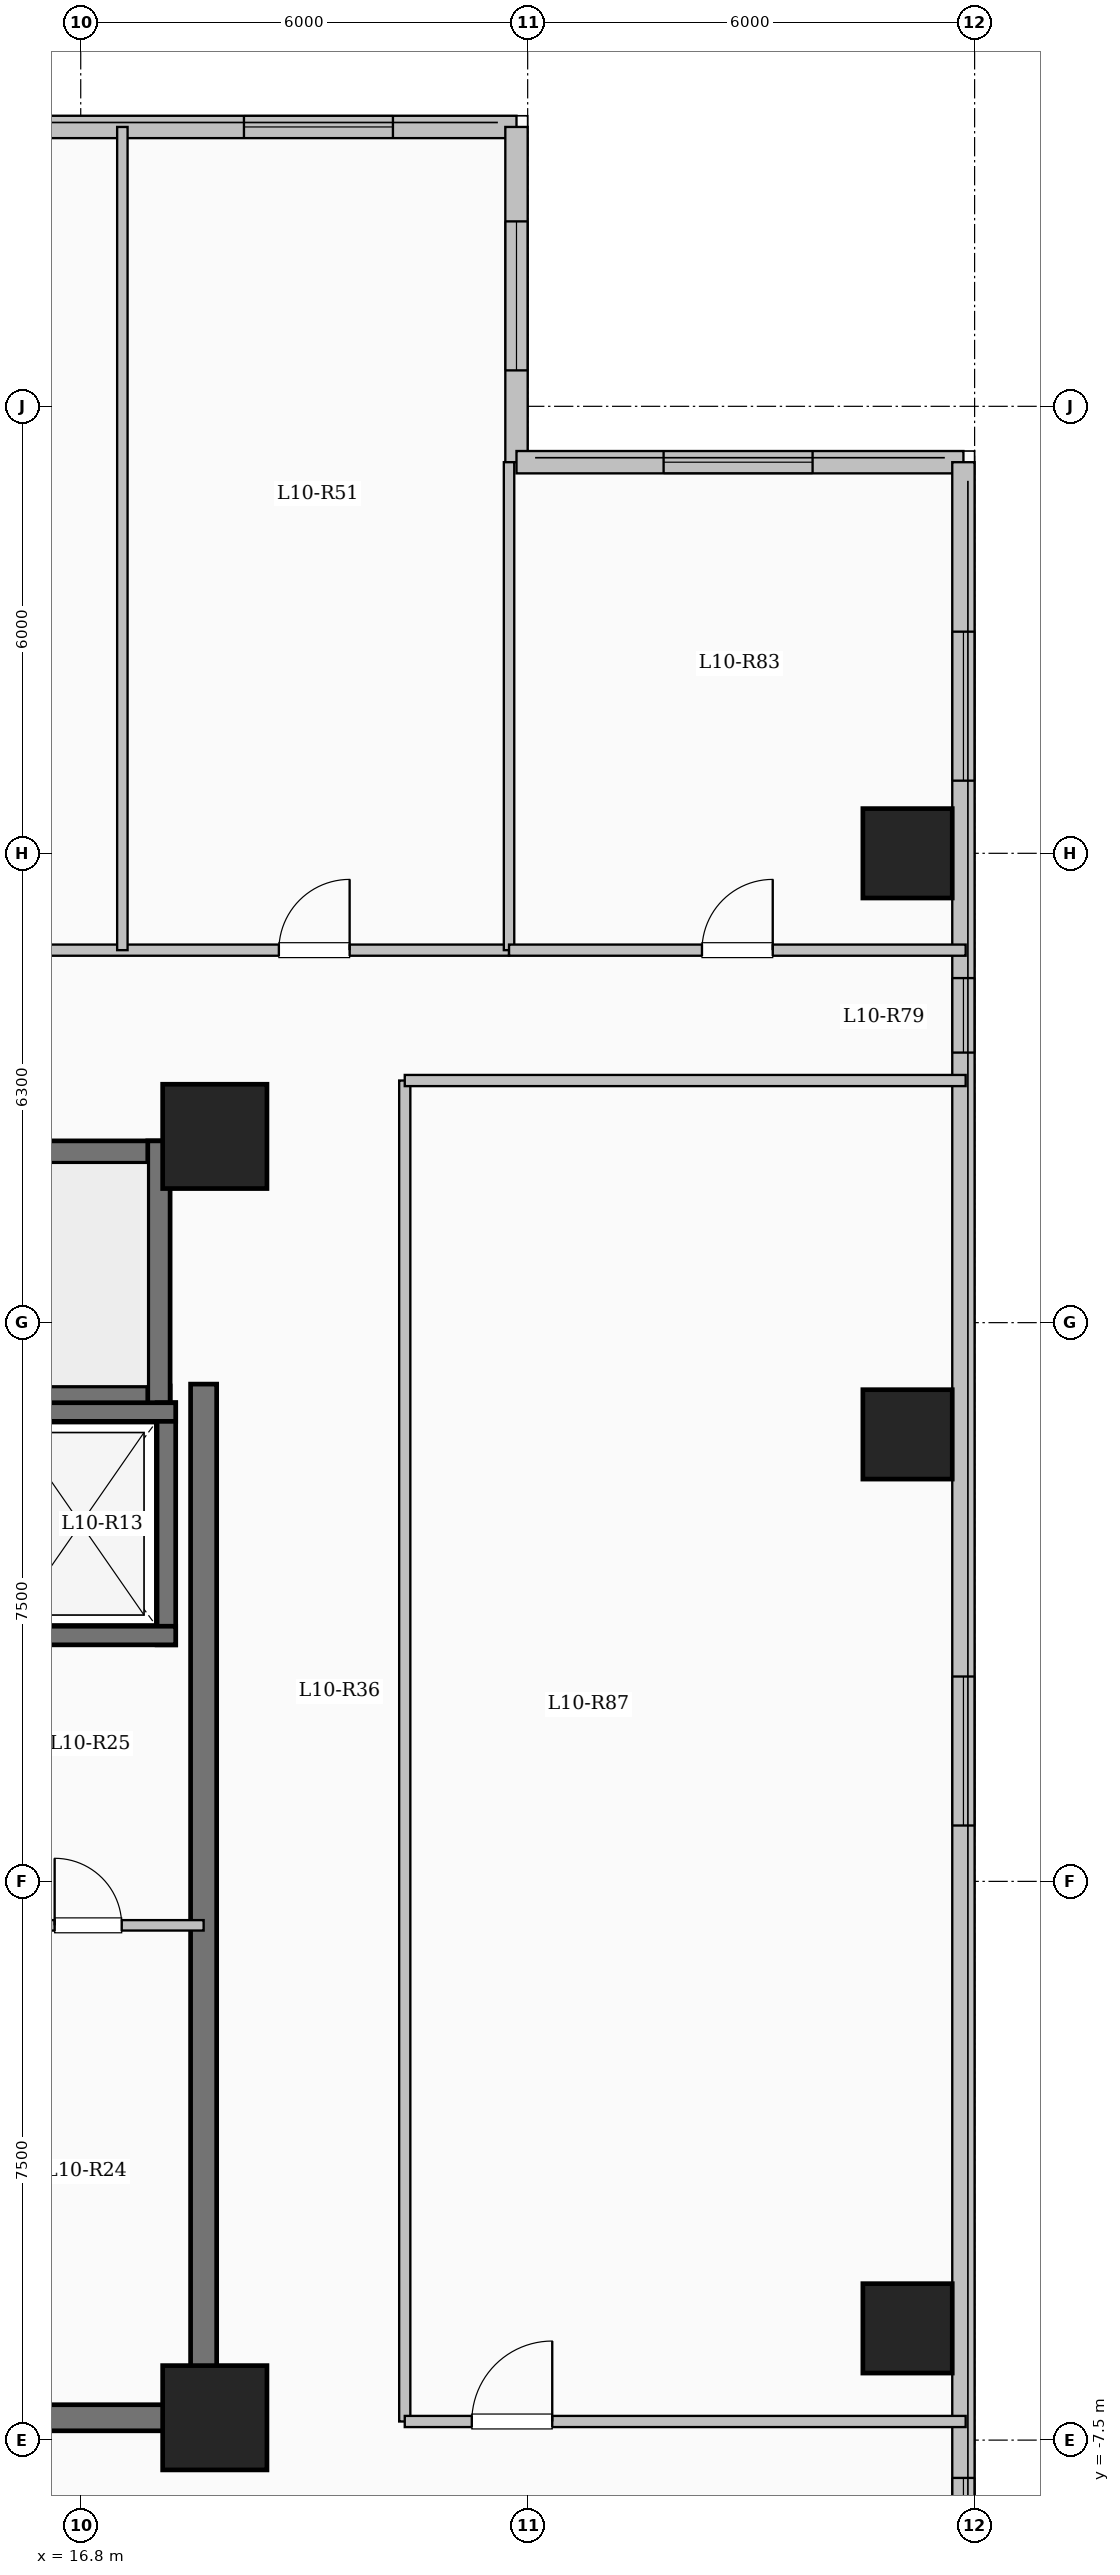
"""IFC4 building model, lengths in metres.
Left out: names, types, materials, properties, quantities, classifications, styles, units other than length and angle.
Written with IfcOpenShell. Run it as: python <this file> out.ifc"""

import sys

from ifc_helpers import new_model, si_unit, direction, frame, frame_2d, origin, origin_2d, place, context, subcontext, project, spatial, rectangle, extrude, element, fill, save


model = new_model("IFC4")
c1 = context("Model", 3, precision=1e-05, world=origin(), true_north=direction((0.0, 1.0)))
c2 = subcontext(c1, "Body", "Model", "MODEL_VIEW")
j1 = project(units=[si_unit("LENGTHUNIT", "METRE"), si_unit("PLANEANGLEUNIT", "RADIAN")], contexts=[c1])
p1 = place(None, origin())
s1 = spatial("IfcSite", under=j1, at=p1, CompositionType="ELEMENT")
p2 = place(p1, origin())
s2 = spatial("IfcBuilding", under=s1, at=p2, CompositionType="ELEMENT")
p3 = place(p2, frame((0.0, 0.0, 40.75)))
s3 = spatial("IfcBuildingStorey", under=s2, at=p3, CompositionType="ELEMENT", Elevation=40.75)
for number, where, z_axis, x_axis in (
    (1, (18.6, -7.2, 0.0), (0.0, 0.0, 1.0), (1.0, 0.0, 0.0)),
    (2, (18.6, 10.0, 0.0), (0.0, 0.0, 1.0), (1.0, 0.0, 0.0)),
):
    element("IfcColumn", number, at=place(p3, frame(where, z_axis=z_axis, x_axis=x_axis)), inside=s3, PredefinedType="COLUMN", context=c2, shape_type="SweptSolid", body=[
        extrude(rectangle(XDim=1.4, YDim=1.4, at=origin_2d()), origin(), (0.0, 0.0, 1.0), 3.35),
    ])
for number, where, z_axis, x_axis in (
    (3, (27.9, -6.0, 0.0), (0.0, 0.0, 1.0), (1.0, 0.0, 0.0)),
    (4, (27.9, 6.0, 0.0), (0.0, 0.0, 1.0), (1.0, 0.0, 0.0)),
    (5, (27.9, 13.8, 0.0), (0.0, 0.0, 1.0), (1.0, 0.0, 0.0)),
):
    element("IfcColumn", number, at=place(p3, frame(where, z_axis=z_axis, x_axis=x_axis)), inside=s3, PredefinedType="COLUMN", context=c2, shape_type="SweptSolid", body=[
        extrude(rectangle(XDim=1.2, YDim=1.2, at=origin_2d()), origin(), (0.0, 0.0, 1.0), 3.35),
    ])
p4 = place(p3, frame((7.35, 23.55, 0.0), z_axis=(0.0, 0.0, 1.0), x_axis=(1.0, 0.0, 0.0)))
e6 = element("IfcWall", 6, at=p4, inside=s3, PredefinedType="SOLIDWALL", context=c2, shape_type="SweptSolid", body=[
    extrude(rectangle(XDim=15.3, YDim=0.3, at=frame_2d((7.65, 0.0))), origin(), (0.0, 0.0, 1.0), 3.1),
])
p5 = place(p4, frame((0.705, 0.0, 0.9)))
e7 = element("IfcOpeningElement", 7, at=p5, cuts=e6, PredefinedType="OPENING", context=c2, shape_type="SweptSolid", body=[
    extrude(rectangle(XDim=1.8, YDim=1.65, at=frame_2d((0.9, 0.825))), frame((0.0, 0.16, 0.0), z_axis=(0.0, -1.0, 0.0), x_axis=(1.0, 0.0, 0.0)), (0.0, 0.0, 1.0), 0.32),
])
p6 = place(p4, frame((5.672, 0.0, 0.9)))
e8 = element("IfcOpeningElement", 8, at=p6, cuts=e6, PredefinedType="OPENING", context=c2, shape_type="SweptSolid", body=[
    extrude(rectangle(XDim=2.0, YDim=1.7, at=frame_2d((1.0, 0.85))), frame((0.0, 0.16, 0.0), z_axis=(0.0, -1.0, 0.0), x_axis=(1.0, 0.0, 0.0)), (0.0, 0.0, 1.0), 0.32),
])
p7 = place(p4, frame((11.641, 0.0, 0.9)))
e9 = element("IfcOpeningElement", 9, at=p7, cuts=e6, PredefinedType="OPENING", context=c2, shape_type="SweptSolid", body=[
    extrude(rectangle(XDim=2.0, YDim=1.7, at=frame_2d((1.0, 0.85))), frame((0.0, 0.16, 0.0), z_axis=(0.0, -1.0, 0.0), x_axis=(1.0, 0.0, 0.0)), (0.0, 0.0, 1.0), 0.32),
])
p8 = place(p3, frame((22.65, 23.55, 0.0), z_axis=(0.0, 0.0, 1.0), x_axis=(0.0, -1.0, 0.0)))
e10 = element("IfcWall", 10, at=p8, inside=s3, PredefinedType="SOLIDWALL", context=c2, shape_type="SweptSolid", body=[
    extrude(rectangle(XDim=4.5, YDim=0.3, at=frame_2d((2.25, 0.0))), origin(), (0.0, 0.0, 1.0), 3.1),
])
p9 = place(p8, frame((1.268, 0.0, 0.9)))
e11 = element("IfcOpeningElement", 11, at=p9, cuts=e10, PredefinedType="OPENING", context=c2, shape_type="SweptSolid", body=[
    extrude(rectangle(XDim=2.0, YDim=1.7, at=frame_2d((1.0, 0.85))), frame((0.0, 0.16, 0.0), z_axis=(0.0, -1.0, 0.0), x_axis=(1.0, 0.0, 0.0)), (0.0, 0.0, 1.0), 0.32),
])
p10 = place(p3, frame((22.65, 19.05, 0.0), z_axis=(0.0, 0.0, 1.0), x_axis=(1.0, 0.0, 0.0)))
e12 = element("IfcWall", 12, at=p10, inside=s3, PredefinedType="SOLIDWALL", context=c2, shape_type="SweptSolid", body=[
    extrude(rectangle(XDim=6.0, YDim=0.3, at=frame_2d((3.0, 0.0))), origin(), (0.0, 0.0, 1.0), 3.1),
])
p11 = place(p10, frame((1.975, 0.0, 0.9)))
e13 = element("IfcOpeningElement", 13, at=p11, cuts=e12, PredefinedType="OPENING", context=c2, shape_type="SweptSolid", body=[
    extrude(rectangle(XDim=2.0, YDim=1.7, at=frame_2d((1.0, 0.85))), frame((0.0, 0.16, 0.0), z_axis=(0.0, -1.0, 0.0), x_axis=(1.0, 0.0, 0.0)), (0.0, 0.0, 1.0), 0.32),
])
p12 = place(p3, frame((28.65, 19.05, 0.0), z_axis=(0.0, 0.0, 1.0), x_axis=(0.0, -1.0, 0.0)))
e14 = element("IfcWall", 14, at=p12, inside=s3, PredefinedType="SOLIDWALL", context=c2, shape_type="SweptSolid", body=[
    extrude(rectangle(XDim=38.1, YDim=0.3, at=frame_2d((19.05, 0.0))), origin(), (0.0, 0.0, 1.0), 3.1),
])
p13 = place(p12, frame((2.275, 0.0, 0.9)))
e15 = element("IfcOpeningElement", 15, at=p13, cuts=e14, PredefinedType="OPENING", context=c2, shape_type="SweptSolid", body=[
    extrude(rectangle(XDim=2.0, YDim=1.7, at=frame_2d((1.0, 0.85))), frame((0.0, 0.16, 0.0), z_axis=(0.0, -1.0, 0.0), x_axis=(1.0, 0.0, 0.0)), (0.0, 0.0, 1.0), 0.32),
])
p14 = place(p12, frame((6.925, 0.0, 0.95)))
e16 = element("IfcOpeningElement", 16, at=p14, cuts=e14, PredefinedType="OPENING", context=c2, shape_type="SweptSolid", body=[
    extrude(rectangle(XDim=1.0, YDim=1.5, at=frame_2d((0.5, 0.75))), frame((0.0, 0.16, 0.0), z_axis=(0.0, -1.0, 0.0), x_axis=(1.0, 0.0, 0.0)), (0.0, 0.0, 1.0), 0.32),
])
p15 = place(p12, frame((16.3, 0.0, 0.9)))
e17 = element("IfcOpeningElement", 17, at=p15, cuts=e14, PredefinedType="OPENING", context=c2, shape_type="SweptSolid", body=[
    extrude(rectangle(XDim=2.0, YDim=1.7, at=frame_2d((1.0, 0.85))), frame((0.0, 0.16, 0.0), z_axis=(0.0, -1.0, 0.0), x_axis=(1.0, 0.0, 0.0)), (0.0, 0.0, 1.0), 0.32),
])
p16 = place(p12, frame((27.058, 0.0, 0.9)))
e18 = element("IfcOpeningElement", 18, at=p16, cuts=e14, PredefinedType="OPENING", context=c2, shape_type="SweptSolid", body=[
    extrude(rectangle(XDim=1.5, YDim=1.65, at=frame_2d((0.75, 0.825))), frame((0.0, 0.16, 0.0), z_axis=(0.0, -1.0, 0.0), x_axis=(1.0, 0.0, 0.0)), (0.0, 0.0, 1.0), 0.32),
])
p17 = place(p12, frame((32.55, 0.0, 0.9)))
e19 = element("IfcOpeningElement", 19, at=p17, cuts=e14, PredefinedType="OPENING", context=c2, shape_type="SweptSolid", body=[
    extrude(rectangle(XDim=2.4, YDim=1.8, at=frame_2d((1.2, 0.9))), frame((0.0, 0.16, 0.0), z_axis=(0.0, -1.0, 0.0), x_axis=(1.0, 0.0, 0.0)), (0.0, 0.0, 1.0), 0.32),
])
p18 = place(p3, frame((10.0, 9.79, 0.0), z_axis=(0.0, 0.0, 1.0), x_axis=(1.0, 0.0, 0.0)))
e20 = element("IfcWall", 20, at=p18, inside=s3, PredefinedType="SHEAR", context=c2, shape_type="SweptSolid", body=[
    extrude(rectangle(XDim=8.0, YDim=0.3, at=frame_2d((4.0, 0.0))), origin(), (0.0, 0.0, 1.0), 3.35),
])
p19 = place(p3, frame((10.0, 6.5, 0.0), z_axis=(0.0, 0.0, 1.0), x_axis=(1.0, 0.0, 0.0)))
e21 = element("IfcWall", 21, at=p19, inside=s3, PredefinedType="SHEAR", context=c2, shape_type="SweptSolid", body=[
    extrude(rectangle(XDim=8.0, YDim=0.3, at=frame_2d((4.0, 0.0))), origin(), (0.0, 0.0, 1.0), 3.35),
])
p20 = place(p19, frame((0.55, 0.0, 0.0)))
e22 = element("IfcOpeningElement", 22, at=p20, cuts=e21, PredefinedType="OPENING", context=c2, shape_type="SweptSolid", body=[
    extrude(rectangle(XDim=1.0, YDim=2.15, at=frame_2d((0.5, 1.075))), frame((0.0, 0.16, 0.0), z_axis=(0.0, -1.0, 0.0), x_axis=(1.0, 0.0, 0.0)), (0.0, 0.0, 1.0), 0.32),
])
p21 = place(p3, frame((17.85, 6.35, 0.0), z_axis=(0.0, 0.0, 1.0), x_axis=(0.0, 1.0, 0.0)))
e23 = element("IfcWall", 23, at=p21, inside=s3, PredefinedType="SHEAR", context=c2, shape_type="SweptSolid", body=[
    extrude(rectangle(XDim=3.59, YDim=0.3, at=frame_2d((1.795, 0.0))), origin(), (0.0, 0.0, 1.0), 3.35),
])
p22 = place(p3, frame((17.95, 3.175, 0.0), z_axis=(0.0, 0.0, 1.0), x_axis=(0.0, 1.0, 0.0)))
e24 = element("IfcWall", 24, at=p22, inside=s3, PredefinedType="SHEAR", context=c2, shape_type="SweptSolid", body=[
    extrude(rectangle(XDim=3.25, YDim=0.25, at=frame_2d((1.625, 0.0))), origin(), (0.0, 0.0, 1.0), 3.35),
])
for number, where, z_axis, x_axis in (
    (25, (15.525, 3.3, 0.0), (0.0, 0.0, 1.0), (1.0, 0.0, 0.0)),
    (26, (15.525, 6.3, 0.0), (0.0, 0.0, 1.0), (1.0, 0.0, 0.0)),
):
    element("IfcWall", number, at=place(p3, frame(where, z_axis=z_axis, x_axis=x_axis)), inside=s3, PredefinedType="SHEAR", context=c2, shape_type="SweptSolid", body=[
        extrude(rectangle(XDim=2.55, YDim=0.25, at=frame_2d((1.275, 0.0))), origin(), (0.0, 0.0, 1.0), 3.35),
    ])
p23 = place(p3, frame((18.45, -7.375, 0.0), z_axis=(0.0, 0.0, 1.0), x_axis=(0.0, 1.0, 0.0)))
e27 = element("IfcWall", 27, at=p23, inside=s3, PredefinedType="SHEAR", context=c2, shape_type="SweptSolid", body=[
    extrude(rectangle(XDim=14.05, YDim=0.35, at=frame_2d((7.025, 0.0))), origin(), (0.0, 0.0, 1.0), 3.35),
])
p24 = place(p3, frame((10.075, -7.2, 0.0), z_axis=(0.0, 0.0, 1.0), x_axis=(1.0, 0.0, 0.0)))
e28 = element("IfcWall", 28, at=p24, inside=s3, PredefinedType="SHEAR", context=c2, shape_type="SweptSolid", body=[
    extrude(rectangle(XDim=8.55, YDim=0.35, at=frame_2d((4.275, 0.0))), origin(), (0.0, 0.0, 1.0), 3.35),
])
p25 = place(p3, frame((15.4, -0.59, 0.0), z_axis=(0.0, 0.0, 1.0), x_axis=(1.0, 0.0, 0.0)))
e29 = element("IfcWall", 29, at=p25, inside=s3, PredefinedType="PARTITIONING", context=c2, shape_type="SweptSolid", body=[
    extrude(rectangle(XDim=3.05, YDim=0.14, at=frame_2d((1.525, 0.0))), origin(), (0.0, 0.0, 1.0), 3.1),
])
p26 = place(p25, frame((1.05, 0.0, 0.0)))
e30 = element("IfcOpeningElement", 30, at=p26, cuts=e29, PredefinedType="OPENING", context=c2, shape_type="SweptSolid", body=[
    extrude(rectangle(XDim=0.9, YDim=2.08, at=frame_2d((0.45, 1.04))), frame((0.0, 0.08, 0.0), z_axis=(0.0, -1.0, 0.0), x_axis=(1.0, 0.0, 0.0)), (0.0, 0.0, 1.0), 0.16),
])
p27 = place(p3, frame((3.85, 12.5, 0.0), z_axis=(0.0, 0.0, 1.0), x_axis=(1.0, 0.0, 0.0)))
e31 = element("IfcWall", 31, at=p27, inside=s3, PredefinedType="PARTITIONING", context=c2, shape_type="SweptSolid", body=[
    extrude(rectangle(XDim=18.7, YDim=0.15, at=frame_2d((9.35, 0.0))), origin(), (0.0, 0.0, 1.0), 3.1),
])
p28 = place(p27, frame((2.942, 0.0, 0.0)))
e32 = element("IfcOpeningElement", 32, at=p28, cuts=e31, PredefinedType="OPENING", context=c2, shape_type="SweptSolid", body=[
    extrude(rectangle(XDim=0.95, YDim=2.15, at=frame_2d((0.475, 1.075))), frame((0.0, 0.085, 0.0), z_axis=(0.0, -1.0, 0.0), x_axis=(1.0, 0.0, 0.0)), (0.0, 0.0, 1.0), 0.17),
])
p29 = place(p27, frame((9.647, 0.0, 0.0)))
e33 = element("IfcOpeningElement", 33, at=p29, cuts=e31, PredefinedType="OPENING", context=c2, shape_type="SweptSolid", body=[
    extrude(rectangle(XDim=0.95, YDim=2.15, at=frame_2d((0.475, 1.075))), frame((0.0, 0.085, 0.0), z_axis=(0.0, -1.0, 0.0), x_axis=(1.0, 0.0, 0.0)), (0.0, 0.0, 1.0), 0.17),
])
p30 = place(p27, frame((15.61, 0.0, 0.0)))
e34 = element("IfcOpeningElement", 34, at=p30, cuts=e31, PredefinedType="OPENING", context=c2, shape_type="SweptSolid", body=[
    extrude(rectangle(XDim=0.95, YDim=2.15, at=frame_2d((0.475, 1.075))), frame((0.0, 0.085, 0.0), z_axis=(0.0, -1.0, 0.0), x_axis=(1.0, 0.0, 0.0)), (0.0, 0.0, 1.0), 0.17),
])
p31 = place(p3, frame((21.15, -7.25, 0.0), z_axis=(0.0, 0.0, 1.0), x_axis=(0.0, 1.0, 0.0)))
e35 = element("IfcWall", 35, at=p31, inside=s3, PredefinedType="PARTITIONING", context=c2, shape_type="SweptSolid", body=[
    extrude(rectangle(XDim=18.0, YDim=0.15, at=frame_2d((9.0, 0.0))), origin(), (0.0, 0.0, 1.0), 2.585),
])
p32 = place(p3, frame((17.359, 12.5, 0.0), z_axis=(0.0, 0.0, 1.0), x_axis=(0.0, 1.0, 0.0)))
e36 = element("IfcWall", 36, at=p32, inside=s3, PredefinedType="PARTITIONING", context=c2, shape_type="SweptSolid", body=[
    extrude(rectangle(XDim=11.05, YDim=0.14, at=frame_2d((5.525, 0.0))), origin(), (0.0, 0.0, 1.0), 3.1),
])
p33 = place(p3, frame((21.15, -7.25, 0.0), z_axis=(0.0, 0.0, 1.0), x_axis=(1.0, 0.0, 0.0)))
e37 = element("IfcWall", 37, at=p33, inside=s3, PredefinedType="PARTITIONING", context=c2, shape_type="SweptSolid", body=[
    extrude(rectangle(XDim=7.53, YDim=0.15, at=frame_2d((3.765, 0.0))), origin(), (0.0, 0.0, 1.0), 3.1),
])
p34 = place(p33, frame((0.9, 0.0, 0.0)))
e38 = element("IfcOpeningElement", 38, at=p34, cuts=e37, PredefinedType="OPENING", context=c2, shape_type="SweptSolid", body=[
    extrude(rectangle(XDim=1.08, YDim=2.15, at=frame_2d((0.54, 1.075))), frame((0.0, 0.085, 0.0), z_axis=(0.0, -1.0, 0.0), x_axis=(1.0, 0.0, 0.0)), (0.0, 0.0, 1.0), 0.17),
])
p35 = place(p3, frame((21.15, 10.75, 0.0), z_axis=(0.0, 0.0, 1.0), x_axis=(1.0, 0.0, 0.0)))
e39 = element("IfcWall", 39, at=p35, inside=s3, PredefinedType="PARTITIONING", context=c2, shape_type="SweptSolid", body=[
    extrude(rectangle(XDim=7.53, YDim=0.15, at=frame_2d((3.765, 0.0))), origin(), (0.0, 0.0, 1.0), 3.1),
])
p36 = place(p3, frame((22.55, 12.5, 0.0), z_axis=(0.0, 0.0, 1.0), x_axis=(0.0, 1.0, 0.0)))
e40 = element("IfcWall", 40, at=p36, inside=s3, PredefinedType="PARTITIONING", context=c2, shape_type="SweptSolid", body=[
    extrude(rectangle(XDim=6.55, YDim=0.14, at=frame_2d((3.275, 0.0))), origin(), (0.0, 0.0, 1.0), 3.1),
])
p37 = place(p3, frame((22.55, 12.5, 0.0), z_axis=(0.0, 0.0, 1.0), x_axis=(1.0, 0.0, 0.0)))
e41 = element("IfcWall", 41, at=p37, inside=s3, PredefinedType="PARTITIONING", context=c2, shape_type="SweptSolid", body=[
    extrude(rectangle(XDim=6.13, YDim=0.15, at=frame_2d((3.065, 0.0))), origin(), (0.0, 0.0, 1.0), 3.1),
])
p38 = place(p37, frame((2.59, 0.0, 0.0)))
e42 = element("IfcOpeningElement", 42, at=p38, cuts=e41, PredefinedType="OPENING", context=c2, shape_type="SweptSolid", body=[
    extrude(rectangle(XDim=0.95, YDim=2.15, at=frame_2d((0.475, 1.075))), frame((0.0, 0.085, 0.0), z_axis=(0.0, -1.0, 0.0), x_axis=(1.0, 0.0, 0.0)), (0.0, 0.0, 1.0), 0.17),
])
p39 = place(p7, origin())
e43 = element("IfcWindow", 43, at=p39, inside=s3, PartitioningType="SINGLE_PANEL", PredefinedType="WINDOW", context=c2, shape_type="SweptSolid", body=[
    extrude(rectangle(XDim=2.0, YDim=1.7, at=frame_2d((1.0, 0.85))), frame((0.0, 0.03, 0.0), z_axis=(0.0, -1.0, 0.0), x_axis=(1.0, 0.0, 0.0)), (0.0, 0.0, 1.0), 0.06),
])
fill(e9, e43)
p40 = place(p9, origin())
e44 = element("IfcWindow", 44, at=p40, inside=s3, PartitioningType="SINGLE_PANEL", PredefinedType="WINDOW", context=c2, shape_type="SweptSolid", body=[
    extrude(rectangle(XDim=2.0, YDim=1.7, at=frame_2d((1.0, 0.85))), frame((0.0, 0.03, 0.0), z_axis=(0.0, -1.0, 0.0), x_axis=(1.0, 0.0, 0.0)), (0.0, 0.0, 1.0), 0.06),
])
fill(e11, e44)
p41 = place(p11, origin())
e45 = element("IfcWindow", 45, at=p41, inside=s3, PartitioningType="SINGLE_PANEL", PredefinedType="WINDOW", context=c2, shape_type="SweptSolid", body=[
    extrude(rectangle(XDim=2.0, YDim=1.7, at=frame_2d((1.0, 0.85))), frame((0.0, 0.03, 0.0), z_axis=(0.0, -1.0, 0.0), x_axis=(1.0, 0.0, 0.0)), (0.0, 0.0, 1.0), 0.06),
])
fill(e13, e45)
p42 = place(p13, origin())
e46 = element("IfcWindow", 46, at=p42, inside=s3, PartitioningType="SINGLE_PANEL", PredefinedType="WINDOW", context=c2, shape_type="SweptSolid", body=[
    extrude(rectangle(XDim=2.0, YDim=1.7, at=frame_2d((1.0, 0.85))), frame((0.0, 0.03, 0.0), z_axis=(0.0, -1.0, 0.0), x_axis=(1.0, 0.0, 0.0)), (0.0, 0.0, 1.0), 0.06),
])
fill(e15, e46)
p43 = place(p14, origin())
e47 = element("IfcWindow", 47, at=p43, inside=s3, PartitioningType="SINGLE_PANEL", PredefinedType="WINDOW", context=c2, shape_type="SweptSolid", body=[
    extrude(rectangle(XDim=1.0, YDim=1.5, at=frame_2d((0.5, 0.75))), frame((0.0, 0.03, 0.0), z_axis=(0.0, -1.0, 0.0), x_axis=(1.0, 0.0, 0.0)), (0.0, 0.0, 1.0), 0.06),
])
fill(e16, e47)
p44 = place(p15, origin())
e48 = element("IfcWindow", 48, at=p44, inside=s3, PartitioningType="SINGLE_PANEL", PredefinedType="WINDOW", context=c2, shape_type="SweptSolid", body=[
    extrude(rectangle(XDim=2.0, YDim=1.7, at=frame_2d((1.0, 0.85))), frame((0.0, 0.03, 0.0), z_axis=(0.0, -1.0, 0.0), x_axis=(1.0, 0.0, 0.0)), (0.0, 0.0, 1.0), 0.06),
])
fill(e17, e48)
p45 = place(p16, origin())
e49 = element("IfcWindow", 49, at=p45, inside=s3, PartitioningType="SINGLE_PANEL", PredefinedType="WINDOW", context=c2, shape_type="SweptSolid", body=[
    extrude(rectangle(XDim=1.5, YDim=1.65, at=frame_2d((0.75, 0.825))), frame((0.0, 0.03, 0.0), z_axis=(0.0, -1.0, 0.0), x_axis=(1.0, 0.0, 0.0)), (0.0, 0.0, 1.0), 0.06),
])
fill(e18, e49)
p46 = place(p26, origin())
e50 = element("IfcDoor", 50, at=p46, inside=s3, OperationType="SINGLE_SWING_LEFT", PredefinedType="DOOR", context=c2, shape_type="SweptSolid", body=[
    extrude(rectangle(XDim=0.9, YDim=2.08, at=frame_2d((0.45, 1.04))), frame((0.0, 0.025, 0.0), z_axis=(0.0, -1.0, 0.0), x_axis=(1.0, 0.0, 0.0)), (0.0, 0.0, 1.0), 0.05),
])
fill(e30, e50)
p47 = place(p30, origin())
e51 = element("IfcDoor", 51, at=p47, inside=s3, OperationType="SINGLE_SWING_RIGHT", PredefinedType="DOOR", context=c2, shape_type="SweptSolid", body=[
    extrude(rectangle(XDim=0.95, YDim=2.15, at=frame_2d((0.475, 1.075))), frame((0.0, 0.025, 0.0), z_axis=(0.0, -1.0, 0.0), x_axis=(1.0, 0.0, 0.0)), (0.0, 0.0, 1.0), 0.05),
])
fill(e34, e51)
p48 = place(p38, origin())
e52 = element("IfcDoor", 52, at=p48, inside=s3, OperationType="SINGLE_SWING_RIGHT", PredefinedType="DOOR", context=c2, shape_type="SweptSolid", body=[
    extrude(rectangle(XDim=0.95, YDim=2.15, at=frame_2d((0.475, 1.075))), frame((0.0, 0.025, 0.0), z_axis=(0.0, -1.0, 0.0), x_axis=(1.0, 0.0, 0.0)), (0.0, 0.0, 1.0), 0.05),
])
fill(e42, e52)
p49 = place(p34, origin())
e53 = element("IfcDoor", 53, at=p49, inside=s3, OperationType="SINGLE_SWING_RIGHT", PredefinedType="DOOR", context=c2, shape_type="SweptSolid", body=[
    extrude(rectangle(XDim=1.08, YDim=2.15, at=frame_2d((0.54, 1.075))), frame((0.0, 0.025, 0.0), z_axis=(0.0, -1.0, 0.0), x_axis=(1.0, 0.0, 0.0)), (0.0, 0.0, 1.0), 0.05),
])
fill(e38, e53)
save(model, sys.argv[1])
